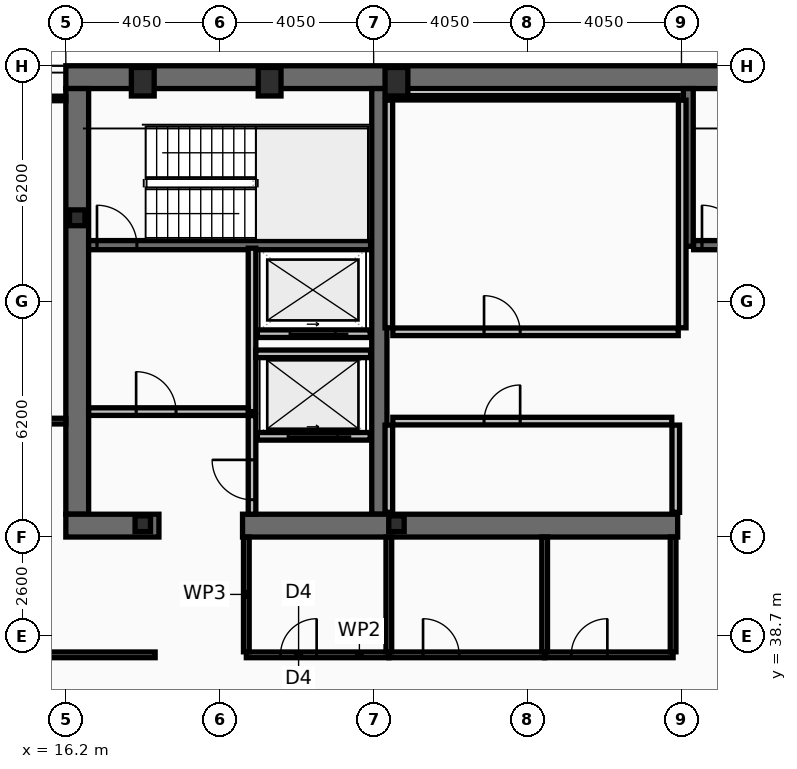
"""IFC4 building model, lengths in metres.
Left out: names, types, materials, properties, quantities, classifications, styles, units other than length and angle.
Written with IfcOpenShell. Run it as: python <this file> out.ifc"""

import sys

from ifc_helpers import new_model, si_unit, direction, frame, frame_2d, origin, origin_2d, place, context, subcontext, project, spatial, rectangle, hollow_rectangle, i_section, extrude, element, fill, save


model = new_model("IFC4")
c1 = context("Model", 3, precision=1e-05, world=origin(), true_north=direction((0.0, 1.0)))
c2 = subcontext(c1, "Body", "Model", "MODEL_VIEW")
j1 = project(units=[si_unit("LENGTHUNIT", "METRE"), si_unit("PLANEANGLEUNIT", "RADIAN")], contexts=[c1])
p1 = place(None, origin())
s1 = spatial("IfcSite", under=j1, at=p1, CompositionType="ELEMENT")
p2 = place(p1, origin())
s2 = spatial("IfcBuilding", under=s1, at=p2, CompositionType="ELEMENT")
p3 = place(p2, frame((0.0, 0.0, 199.4)))
s3 = spatial("IfcBuildingStorey", under=s2, at=p3, CompositionType="ELEMENT", Elevation=199.4)
p4 = place(p3, frame((16.2, 53.4, 0.0), z_axis=(0.0, 0.0, 1.0), x_axis=(1.0, 0.0, 0.0)))
e1 = element("IfcWall", 1, at=p4, inside=s3, PredefinedType="SHEAR", context=c2, shape_type="SweptSolid", body=[
    extrude(rectangle(XDim=40.5, YDim=0.6, at=frame_2d((20.25, 0.0))), origin(), (0.0, 0.0, 1.0), 3.44),
])
p5 = place(p3, frame((16.5, 41.9, 0.0), z_axis=(0.0, 0.0, 1.0), x_axis=(0.0, 1.0, 0.0)))
e2 = element("IfcWall", 2, at=p5, inside=s3, PredefinedType="SHEAR", context=c2, shape_type="SweptSolid", body=[
    extrude(rectangle(XDim=11.2, YDim=0.6, at=frame_2d((5.6, 0.0))), origin(), (0.0, 0.0, 1.0), 3.44),
])
p6 = place(p3, frame((24.45, 41.9, 0.0), z_axis=(0.0, 0.0, 1.0), x_axis=(0.0, 1.0, 0.0)))
e3 = element("IfcWall", 3, at=p6, inside=s3, PredefinedType="SHEAR", context=c2, shape_type="SweptSolid", body=[
    extrude(rectangle(XDim=11.2, YDim=0.4, at=frame_2d((5.6, 0.0))), origin(), (0.0, 0.0, 1.0), 3.44),
])
p7 = place(p3, frame((18.65, 41.6, 0.0), z_axis=(0.0, 0.0, 1.0), x_axis=(-1.0, 0.0, 0.0)))
e4 = element("IfcWall", 4, at=p7, inside=s3, PredefinedType="SHEAR", context=c2, shape_type="SweptSolid", body=[
    extrude(rectangle(XDim=2.45, YDim=0.6, at=frame_2d((1.225, 0.0))), origin(), (0.0, 0.0, 1.0), 3.44),
])
p8 = place(p3, frame((32.3, 41.6, 0.0), z_axis=(0.0, 0.0, 1.0), x_axis=(-1.0, 0.0, 0.0)))
e5 = element("IfcWall", 5, at=p8, inside=s3, PredefinedType="SHEAR", context=c2, shape_type="SweptSolid", body=[
    extrude(rectangle(XDim=11.45, YDim=0.6, at=frame_2d((5.725, 0.0))), origin(), (0.0, 0.0, 1.0), 3.44),
])
p9 = place(p3, frame((32.58, 48.95, 0.0), z_axis=(0.0, 0.0, 1.0), x_axis=(0.0, 1.0, 0.0)))
e6 = element("IfcWall", 6, at=p9, inside=s3, PredefinedType="SHEAR", context=c2, shape_type="SweptSolid", body=[
    extrude(rectangle(XDim=4.15, YDim=0.26, at=frame_2d((2.075, 0.0))), origin(), (0.0, 0.0, 1.0), 3.44),
])
p10 = place(p3, frame((16.8, 48.98, 0.0), z_axis=(0.0, 0.0, 1.0), x_axis=(1.0, 0.0, 0.0)))
e7 = element("IfcWall", 7, at=p10, inside=s3, PredefinedType="SHEAR", context=c2, shape_type="SweptSolid", body=[
    extrude(rectangle(XDim=7.42, YDim=0.24, at=frame_2d((3.71, 0.0))), origin(), (0.0, 0.0, 1.0), 3.44),
])
p11 = place(p10, frame((0.22, 0.0, 0.0)))
e8 = element("IfcOpeningElement", 8, at=p11, cuts=e7, PredefinedType="OPENING", context=c2, shape_type="SweptSolid", body=[
    extrude(rectangle(XDim=1.05, YDim=2.15, at=frame_2d((0.525, 1.075))), frame((0.0, 0.13, 0.0), z_axis=(0.0, -1.0, 0.0), x_axis=(1.0, 0.0, 0.0)), (0.0, 0.0, 1.0), 0.26),
])
p12 = place(p3, frame((32.72, 48.98, 0.0), z_axis=(0.0, 0.0, 1.0), x_axis=(1.0, 0.0, 0.0)))
e9 = element("IfcWall", 9, at=p12, inside=s3, PredefinedType="SHEAR", context=c2, shape_type="SweptSolid", body=[
    extrude(rectangle(XDim=7.56, YDim=0.24, at=frame_2d((3.78, 0.0))), origin(), (0.0, 0.0, 1.0), 3.44),
])
p13 = place(p12, frame((0.22, 0.0, 0.0)))
e10 = element("IfcOpeningElement", 10, at=p13, cuts=e9, PredefinedType="OPENING", context=c2, shape_type="SweptSolid", body=[
    extrude(rectangle(XDim=1.05, YDim=2.15, at=frame_2d((0.525, 1.075))), frame((0.0, 0.13, 0.0), z_axis=(0.0, -1.0, 0.0), x_axis=(1.0, 0.0, 0.0)), (0.0, 0.0, 1.0), 0.26),
])
for number, where, z_axis, x_axis in (
    (11, (18.225, 53.28, 0.0), (0.0, 0.0, 1.0), (1.0, 0.0, 0.0)),
    (12, (21.562, 53.28, 0.0), (0.0, 0.0, 1.0), (1.0, 0.0, 0.0)),
    (13, (24.9, 53.28, 0.0), (0.0, 0.0, 1.0), (1.0, 0.0, 0.0)),
):
    element("IfcColumn", number, at=place(p3, frame(where, z_axis=z_axis, x_axis=x_axis)), inside=s3, PredefinedType="COLUMN", context=c2, shape_type="SweptSolid", body=[
        extrude(hollow_rectangle(XDim=0.6, YDim=0.75, WallThickness=0.045, at=origin_2d()), origin(), (0.0, 0.0, 1.0), 3.6),
    ])
for number, where, z_axis, x_axis in (
    (14, (16.5, 49.7, 0.0), (0.0, 0.0, 1.0), (1.0, 0.0, 0.0)),
    (15, (18.225, 41.65, 0.0), (0.0, 0.0, 1.0), (1.0, 0.0, 0.0)),
    (16, (24.9, 41.65, 0.0), (0.0, 0.0, 1.0), (1.0, 0.0, 0.0)),
):
    element("IfcColumn", number, at=place(p3, frame(where, z_axis=z_axis, x_axis=x_axis)), inside=s3, PredefinedType="COLUMN", context=c2, shape_type="SweptSolid", body=[
        extrude(i_section(OverallWidth=0.406, OverallDepth=0.416, WebThickness=0.03, FlangeThickness=0.048, at=origin_2d()), origin(), (0.0, 0.0, 1.0), 3.6),
    ])
p14 = place(p3, frame((24.21, 43.95, 0.0), z_axis=(0.0, 0.0, 1.0), x_axis=(-1.0, 0.0, 0.0)))
e17 = element("IfcWall", 17, at=p14, inside=s3, PredefinedType="PARTITIONING", context=c2, shape_type="SweptSolid", body=[
    extrude(rectangle(XDim=2.97, YDim=0.2, at=frame_2d((1.485, 0.0))), origin(), (0.0, 0.0, 1.0), 3.44),
])
p15 = place(p14, frame((0.86, 0.0, 0.0)))
e18 = element("IfcOpeningElement", 18, at=p15, cuts=e17, PredefinedType="OPENING", context=c2, shape_type="SweptSolid", body=[
    extrude(rectangle(XDim=1.3, YDim=2.18, at=frame_2d((0.65, 1.09))), frame((0.0, 0.11, 0.0), z_axis=(0.0, -1.0, 0.0), x_axis=(1.0, 0.0, 0.0)), (0.0, 0.0, 1.0), 0.22),
])
p16 = place(p3, frame((24.21, 46.65, 0.0), z_axis=(0.0, 0.0, 1.0), x_axis=(-1.0, 0.0, 0.0)))
e19 = element("IfcWall", 19, at=p16, inside=s3, PredefinedType="PARTITIONING", context=c2, shape_type="SweptSolid", body=[
    extrude(rectangle(XDim=2.97, YDim=0.2, at=frame_2d((1.485, 0.0))), origin(), (0.0, 0.0, 1.0), 3.44),
])
p17 = place(p16, frame((0.91, 0.0, 0.0)))
e20 = element("IfcOpeningElement", 20, at=p17, cuts=e19, PredefinedType="OPENING", context=c2, shape_type="SweptSolid", body=[
    extrude(rectangle(XDim=1.2, YDim=2.18, at=frame_2d((0.6, 1.09))), frame((0.0, 0.11, 0.0), z_axis=(0.0, -1.0, 0.0), x_axis=(1.0, 0.0, 0.0)), (0.0, 0.0, 1.0), 0.22),
])
p18 = place(p3, frame((21.1, 44.6, 0.0), z_axis=(0.0, 0.0, 1.0), x_axis=(0.0, 1.0, 0.0)))
e21 = element("IfcWall", 21, at=p18, inside=s3, PredefinedType="PARTITIONING", context=c2, shape_type="SweptSolid", body=[
    extrude(rectangle(XDim=4.3, YDim=0.2, at=frame_2d((2.15, 0.0))), origin(), (0.0, 0.0, 1.0), 3.44),
])
p19 = place(p3, frame((16.8, 44.6, 0.0), z_axis=(0.0, 0.0, 1.0), x_axis=(1.0, 0.0, 0.0)))
e22 = element("IfcWall", 22, at=p19, inside=s3, PredefinedType="PARTITIONING", context=c2, shape_type="SweptSolid", body=[
    extrude(rectangle(XDim=4.2, YDim=0.2, at=frame_2d((2.1, 0.0))), origin(), (0.0, 0.0, 1.0), 3.44),
])
p20 = place(p19, frame((1.25, 0.0, 0.0)))
e23 = element("IfcOpeningElement", 23, at=p20, cuts=e22, PredefinedType="OPENING", context=c2, shape_type="SweptSolid", body=[
    extrude(rectangle(XDim=1.05, YDim=2.15, at=frame_2d((0.525, 1.075))), frame((0.0, 0.11, 0.0), z_axis=(0.0, -1.0, 0.0), x_axis=(1.0, 0.0, 0.0)), (0.0, 0.0, 1.0), 0.22),
])
p21 = place(p3, frame((21.2, 46.12, 0.0), z_axis=(0.0, 0.0, 1.0), x_axis=(1.0, 0.0, 0.0)))
e24 = element("IfcWall", 24, at=p21, inside=s3, PredefinedType="PARTITIONING", context=c2, shape_type="SweptSolid", body=[
    extrude(rectangle(XDim=3.02, YDim=0.2, at=frame_2d((1.51, 0.0))), origin(), (0.0, 0.0, 1.0), 3.44),
])
p22 = place(p3, frame((21.1, 41.9, 0.0), z_axis=(0.0, 0.0, 1.0), x_axis=(0.0, 1.0, 0.0)))
e25 = element("IfcWall", 25, at=p22, inside=s3, PredefinedType="PARTITIONING", context=c2, shape_type="SweptSolid", body=[
    extrude(rectangle(XDim=2.595, YDim=0.2, at=frame_2d((1.298, 0.0))), origin(), (0.0, 0.0, 1.0), 3.44),
])
p23 = place(p22, frame((0.38, 0.0, 0.0)))
e26 = element("IfcOpeningElement", 26, at=p23, cuts=e25, PredefinedType="OPENING", context=c2, shape_type="SweptSolid", body=[
    extrude(rectangle(XDim=1.05, YDim=2.15, at=frame_2d((0.525, 1.075))), frame((0.0, 0.11, 0.0), z_axis=(0.0, -1.0, 0.0), x_axis=(1.0, 0.0, 0.0)), (0.0, 0.0, 1.0), 0.22),
])
for number, where, z_axis, x_axis in (
    (27, (24.7, 46.805, 0.0), (0.0, 0.0, 1.0), (0.0, 1.0, 0.0)),
    (28, (32.42, 46.805, 0.0), (0.0, 0.0, 1.0), (0.0, 1.0, 0.0)),
):
    element("IfcWall", number, at=place(p3, frame(where, z_axis=z_axis, x_axis=x_axis)), inside=s3, PredefinedType="PARTITIONING", context=c2, shape_type="SweptSolid", body=[
        extrude(rectangle(XDim=5.99, YDim=0.2, at=frame_2d((2.995, 0.0))), origin(), (0.0, 0.0, 1.0), 3.44),
    ])
p24 = place(p3, frame((24.805, 52.86, 0.0), z_axis=(0.0, 0.0, 1.0), x_axis=(1.0, 0.0, 0.0)))
e29 = element("IfcWall", 29, at=p24, inside=s3, PredefinedType="PARTITIONING", context=c2, shape_type="SweptSolid", body=[
    extrude(rectangle(XDim=7.51, YDim=0.12, at=frame_2d((3.755, 0.0))), origin(), (0.0, 0.0, 1.0), 3.44),
])
p25 = place(p3, frame((24.805, 46.7, 0.0), z_axis=(0.0, 0.0, 1.0), x_axis=(1.0, 0.0, 0.0)))
e30 = element("IfcWall", 30, at=p25, inside=s3, PredefinedType="PARTITIONING", context=c2, shape_type="SweptSolid", body=[
    extrude(rectangle(XDim=7.51, YDim=0.2, at=frame_2d((3.755, 0.0))), origin(), (0.0, 0.0, 1.0), 3.44),
])
p26 = place(p25, frame((2.4, 0.0, 0.0)))
e31 = element("IfcOpeningElement", 31, at=p26, cuts=e30, PredefinedType="OPENING", context=c2, shape_type="SweptSolid", body=[
    extrude(rectangle(XDim=0.95, YDim=2.1, at=frame_2d((0.475, 1.05))), frame((0.0, 0.11, 0.0), z_axis=(0.0, -1.0, 0.0), x_axis=(1.0, 0.0, 0.0)), (0.0, 0.0, 1.0), 0.22),
])
for number, where, z_axis, x_axis in (
    (32, (24.7, 41.95, 0.0), (0.0, 0.0, 1.0), (0.0, 1.0, 0.0)),
    (33, (32.25, 41.95, 0.0), (0.0, 0.0, 1.0), (0.0, 1.0, 0.0)),
):
    element("IfcWall", number, at=place(p3, frame(where, z_axis=z_axis, x_axis=x_axis)), inside=s3, PredefinedType="PARTITIONING", context=c2, shape_type="SweptSolid", body=[
        extrude(rectangle(XDim=2.295, YDim=0.2, at=frame_2d((1.147, 0.0))), origin(), (0.0, 0.0, 1.0), 3.44),
    ])
p27 = place(p3, frame((24.805, 44.35, 0.0), z_axis=(0.0, 0.0, 1.0), x_axis=(1.0, 0.0, 0.0)))
e34 = element("IfcWall", 34, at=p27, inside=s3, PredefinedType="PARTITIONING", context=c2, shape_type="SweptSolid", body=[
    extrude(rectangle(XDim=7.34, YDim=0.2, at=frame_2d((3.67, 0.0))), origin(), (0.0, 0.0, 1.0), 3.44),
])
p28 = place(p27, frame((2.4, 0.0, 0.0)))
e35 = element("IfcOpeningElement", 35, at=p28, cuts=e34, PredefinedType="OPENING", context=c2, shape_type="SweptSolid", body=[
    extrude(rectangle(XDim=0.95, YDim=2.1, at=frame_2d((0.475, 1.05))), frame((0.0, 0.11, 0.0), z_axis=(0.0, -1.0, 0.0), x_axis=(1.0, 0.0, 0.0)), (0.0, 0.0, 1.0), 0.22),
])
p29 = place(p3, frame((20.95, 38.2, 0.0), z_axis=(0.0, 0.0, 1.0), x_axis=(1.0, 0.0, 0.0)))
e36 = element("IfcWall", 36, at=p29, inside=s3, PredefinedType="PARTITIONING", context=c2, shape_type="SweptSolid", body=[
    extrude(rectangle(XDim=3.75, YDim=0.15, at=frame_2d((1.875, 0.0))), origin(), (0.0, 0.0, 1.0), 2.73),
])
p30 = place(p29, frame((0.9, 0.0, 0.0)))
e37 = element("IfcOpeningElement", 37, at=p30, cuts=e36, PredefinedType="OPENING", context=c2, shape_type="SweptSolid", body=[
    extrude(rectangle(XDim=0.95, YDim=2.05, at=frame_2d((0.475, 1.025))), frame((0.0, 0.085, 0.0), z_axis=(0.0, -1.0, 0.0), x_axis=(1.0, 0.0, 0.0)), (0.0, 0.0, 1.0), 0.17),
])
p31 = place(p3, frame((24.7, 38.2, 0.0), z_axis=(0.0, 0.0, 1.0), x_axis=(1.0, 0.0, 0.0)))
e38 = element("IfcWall", 38, at=p31, inside=s3, PredefinedType="PARTITIONING", context=c2, shape_type="SweptSolid", body=[
    extrude(rectangle(XDim=4.1, YDim=0.15, at=frame_2d((2.05, 0.0))), origin(), (0.0, 0.0, 1.0), 2.73),
])
p32 = place(p31, frame((0.9, 0.0, 0.0)))
e39 = element("IfcOpeningElement", 39, at=p32, cuts=e38, PredefinedType="OPENING", context=c2, shape_type="SweptSolid", body=[
    extrude(rectangle(XDim=0.95, YDim=2.05, at=frame_2d((0.475, 1.025))), frame((0.0, 0.085, 0.0), z_axis=(0.0, -1.0, 0.0), x_axis=(1.0, 0.0, 0.0)), (0.0, 0.0, 1.0), 0.17),
])
p33 = place(p3, frame((28.8, 38.2, 0.0), z_axis=(0.0, 0.0, 1.0), x_axis=(1.0, 0.0, 0.0)))
e40 = element("IfcWall", 40, at=p33, inside=s3, PredefinedType="PARTITIONING", context=c2, shape_type="SweptSolid", body=[
    extrude(rectangle(XDim=3.38, YDim=0.15, at=frame_2d((1.69, 0.0))), origin(), (0.0, 0.0, 1.0), 2.73),
])
p34 = place(p33, frame((0.7, 0.0, 0.0)))
e41 = element("IfcOpeningElement", 41, at=p34, cuts=e40, PredefinedType="OPENING", context=c2, shape_type="SweptSolid", body=[
    extrude(rectangle(XDim=0.95, YDim=2.05, at=frame_2d((0.475, 1.025))), frame((0.0, 0.085, 0.0), z_axis=(0.0, -1.0, 0.0), x_axis=(1.0, 0.0, 0.0)), (0.0, 0.0, 1.0), 0.17),
])
p35 = place(p3, frame((20.95, 38.28, 0.0), z_axis=(0.0, 0.0, 1.0), x_axis=(0.0, 1.0, 0.0)))
e42 = element("IfcWall", 42, at=p35, inside=s3, PredefinedType="PARTITIONING", context=c2, shape_type="SweptSolid", body=[
    extrude(rectangle(XDim=3.02, YDim=0.15, at=frame_2d((1.51, 0.0))), origin(), (0.0, 0.0, 1.0), 3.44),
])
p36 = place(p3, frame((24.7, 38.28, 0.0), z_axis=(0.0, 0.0, 1.0), x_axis=(0.0, 1.0, 0.0)))
e43 = element("IfcWall", 43, at=p36, inside=s3, PredefinedType="PARTITIONING", context=c2, shape_type="SweptSolid", body=[
    extrude(rectangle(XDim=3.02, YDim=0.15, at=frame_2d((1.51, 0.0))), origin(), (0.0, 0.0, 1.0), 2.73),
])
for number, where, z_axis, x_axis in (
    (44, (28.8, 38.28, 0.0), (0.0, 0.0, 1.0), (0.0, 1.0, 0.0)),
    (45, (32.18, 38.28, 0.0), (0.0, 0.0, 1.0), (0.0, 1.0, 0.0)),
):
    element("IfcWall", number, at=place(p3, frame(where, z_axis=z_axis, x_axis=x_axis)), inside=s3, PredefinedType="PARTITIONING", context=c2, shape_type="SweptSolid", body=[
        extrude(rectangle(XDim=3.02, YDim=0.15, at=frame_2d((1.51, 0.0))), origin(), (0.0, 0.0, 1.0), 3.44),
    ])
p37 = place(p3, frame((8.03, 38.2, 0.0), z_axis=(0.0, 0.0, 1.0), x_axis=(1.0, 0.0, 0.0)))
e46 = element("IfcWall", 46, at=p37, inside=s3, PredefinedType="PARTITIONING", context=c2, shape_type="SweptSolid", body=[
    extrude(rectangle(XDim=10.52, YDim=0.15, at=frame_2d((5.26, 0.0))), origin(), (0.0, 0.0, 1.0), 2.73),
])
p38 = place(p37, frame((6.32, 0.0, 0.0)))
e47 = element("IfcOpeningElement", 47, at=p38, cuts=e46, PredefinedType="OPENING", context=c2, shape_type="SweptSolid", body=[
    extrude(rectangle(XDim=0.95, YDim=2.05, at=frame_2d((0.475, 1.025))), frame((0.0, 0.085, 0.0), z_axis=(0.0, -1.0, 0.0), x_axis=(1.0, 0.0, 0.0)), (0.0, 0.0, 1.0), 0.17),
])
p39 = place(p3, frame((8.095, 44.35, 0.0), z_axis=(0.0, 0.0, 1.0), x_axis=(1.0, 0.0, 0.0)))
e48 = element("IfcWall", 48, at=p39, inside=s3, PredefinedType="PARTITIONING", context=c2, shape_type="SweptSolid", body=[
    extrude(rectangle(XDim=8.105, YDim=0.15, at=frame_2d((4.052, 0.0))), origin(), (0.0, 0.0, 1.0), 2.83),
])
p40 = place(p39, frame((6.32, 0.0, 0.0)))
e49 = element("IfcOpeningElement", 49, at=p40, cuts=e48, PredefinedType="OPENING", context=c2, shape_type="SweptSolid", body=[
    extrude(rectangle(XDim=0.9, YDim=2.05, at=frame_2d((0.45, 1.025))), frame((0.0, 0.085, 0.0), z_axis=(0.0, -1.0, 0.0), x_axis=(1.0, 0.0, 0.0)), (0.0, 0.0, 1.0), 0.17),
])
p41 = place(p3, frame((8.095, 52.84, 0.0), z_axis=(0.0, 0.0, 1.0), x_axis=(1.0, 0.0, 0.0)))
e50 = element("IfcWall", 50, at=p41, inside=s3, PredefinedType="PARTITIONING", context=c2, shape_type="SweptSolid", body=[
    extrude(rectangle(XDim=8.105, YDim=0.12, at=frame_2d((4.052, 0.0))), origin(), (0.0, 0.0, 1.0), 3.44),
])
p42 = place(p11, origin())
e51 = element("IfcDoor", 51, at=p42, inside=s3, OperationType="SINGLE_SWING_LEFT", PredefinedType="DOOR", context=c2, shape_type="SweptSolid", body=[
    extrude(rectangle(XDim=1.05, YDim=2.15, at=frame_2d((0.525, 1.075))), frame((0.0, 0.025, 0.0), z_axis=(0.0, -1.0, 0.0), x_axis=(1.0, 0.0, 0.0)), (0.0, 0.0, 1.0), 0.05),
])
fill(e8, e51)
p43 = place(p13, origin())
e52 = element("IfcDoor", 52, at=p43, inside=s3, OperationType="SINGLE_SWING_LEFT", PredefinedType="DOOR", context=c2, shape_type="SweptSolid", body=[
    extrude(rectangle(XDim=1.05, YDim=2.15, at=frame_2d((0.525, 1.075))), frame((0.0, 0.025, 0.0), z_axis=(0.0, -1.0, 0.0), x_axis=(1.0, 0.0, 0.0)), (0.0, 0.0, 1.0), 0.05),
])
fill(e10, e52)
p44 = place(p15, origin())
e53 = element("IfcDoor", 53, at=p44, inside=s3, OperationType="SLIDING_TO_LEFT", PredefinedType="DOOR", context=c2, shape_type="SweptSolid", body=[
    extrude(rectangle(XDim=1.3, YDim=2.18, at=frame_2d((0.65, 1.09))), frame((0.0, 0.025, 0.0), z_axis=(0.0, -1.0, 0.0), x_axis=(1.0, 0.0, 0.0)), (0.0, 0.0, 1.0), 0.05),
])
fill(e18, e53)
p45 = place(p17, origin())
e54 = element("IfcDoor", 54, at=p45, inside=s3, OperationType="SLIDING_TO_LEFT", PredefinedType="DOOR", context=c2, shape_type="SweptSolid", body=[
    extrude(rectangle(XDim=1.2, YDim=2.18, at=frame_2d((0.6, 1.09))), frame((0.0, 0.025, 0.0), z_axis=(0.0, -1.0, 0.0), x_axis=(1.0, 0.0, 0.0)), (0.0, 0.0, 1.0), 0.05),
])
fill(e20, e54)
p46 = place(p20, origin())
e55 = element("IfcDoor", 55, at=p46, inside=s3, OperationType="SINGLE_SWING_LEFT", PredefinedType="DOOR", context=c2, shape_type="SweptSolid", body=[
    extrude(rectangle(XDim=1.05, YDim=2.15, at=frame_2d((0.525, 1.075))), frame((0.0, 0.025, 0.0), z_axis=(0.0, -1.0, 0.0), x_axis=(1.0, 0.0, 0.0)), (0.0, 0.0, 1.0), 0.05),
])
fill(e23, e55)
p47 = place(p23, origin())
e56 = element("IfcDoor", 56, at=p47, inside=s3, OperationType="SINGLE_SWING_RIGHT", PredefinedType="DOOR", context=c2, shape_type="SweptSolid", body=[
    extrude(rectangle(XDim=1.05, YDim=2.15, at=frame_2d((0.525, 1.075))), frame((0.0, 0.025, 0.0), z_axis=(0.0, -1.0, 0.0), x_axis=(1.0, 0.0, 0.0)), (0.0, 0.0, 1.0), 0.05),
])
fill(e26, e56)
p48 = place(p26, origin())
e57 = element("IfcDoor", 57, at=p48, inside=s3, OperationType="SINGLE_SWING_LEFT", PredefinedType="DOOR", context=c2, shape_type="SweptSolid", body=[
    extrude(rectangle(XDim=0.95, YDim=2.1, at=frame_2d((0.475, 1.05))), frame((0.0, 0.025, 0.0), z_axis=(0.0, -1.0, 0.0), x_axis=(1.0, 0.0, 0.0)), (0.0, 0.0, 1.0), 0.05),
])
fill(e31, e57)
p49 = place(p28, origin())
e58 = element("IfcDoor", 58, at=p49, inside=s3, OperationType="SINGLE_SWING_RIGHT", PredefinedType="DOOR", context=c2, shape_type="SweptSolid", body=[
    extrude(rectangle(XDim=0.95, YDim=2.1, at=frame_2d((0.475, 1.05))), frame((0.0, 0.025, 0.0), z_axis=(0.0, -1.0, 0.0), x_axis=(1.0, 0.0, 0.0)), (0.0, 0.0, 1.0), 0.05),
])
fill(e35, e58)
p50 = place(p30, origin())
e59 = element("IfcDoor", 59, at=p50, inside=s3, OperationType="SINGLE_SWING_RIGHT", PredefinedType="DOOR", context=c2, shape_type="SweptSolid", body=[
    extrude(rectangle(XDim=0.95, YDim=2.05, at=frame_2d((0.475, 1.025))), frame((0.0, 0.025, 0.0), z_axis=(0.0, -1.0, 0.0), x_axis=(1.0, 0.0, 0.0)), (0.0, 0.0, 1.0), 0.05),
])
fill(e37, e59)
p51 = place(p32, origin())
e60 = element("IfcDoor", 60, at=p51, inside=s3, OperationType="SINGLE_SWING_LEFT", PredefinedType="DOOR", context=c2, shape_type="SweptSolid", body=[
    extrude(rectangle(XDim=0.95, YDim=2.05, at=frame_2d((0.475, 1.025))), frame((0.0, 0.025, 0.0), z_axis=(0.0, -1.0, 0.0), x_axis=(1.0, 0.0, 0.0)), (0.0, 0.0, 1.0), 0.05),
])
fill(e39, e60)
p52 = place(p34, origin())
e61 = element("IfcDoor", 61, at=p52, inside=s3, OperationType="SINGLE_SWING_RIGHT", PredefinedType="DOOR", context=c2, shape_type="SweptSolid", body=[
    extrude(rectangle(XDim=0.95, YDim=2.05, at=frame_2d((0.475, 1.025))), frame((0.0, 0.025, 0.0), z_axis=(0.0, -1.0, 0.0), x_axis=(1.0, 0.0, 0.0)), (0.0, 0.0, 1.0), 0.05),
])
fill(e41, e61)
save(model, sys.argv[1])
